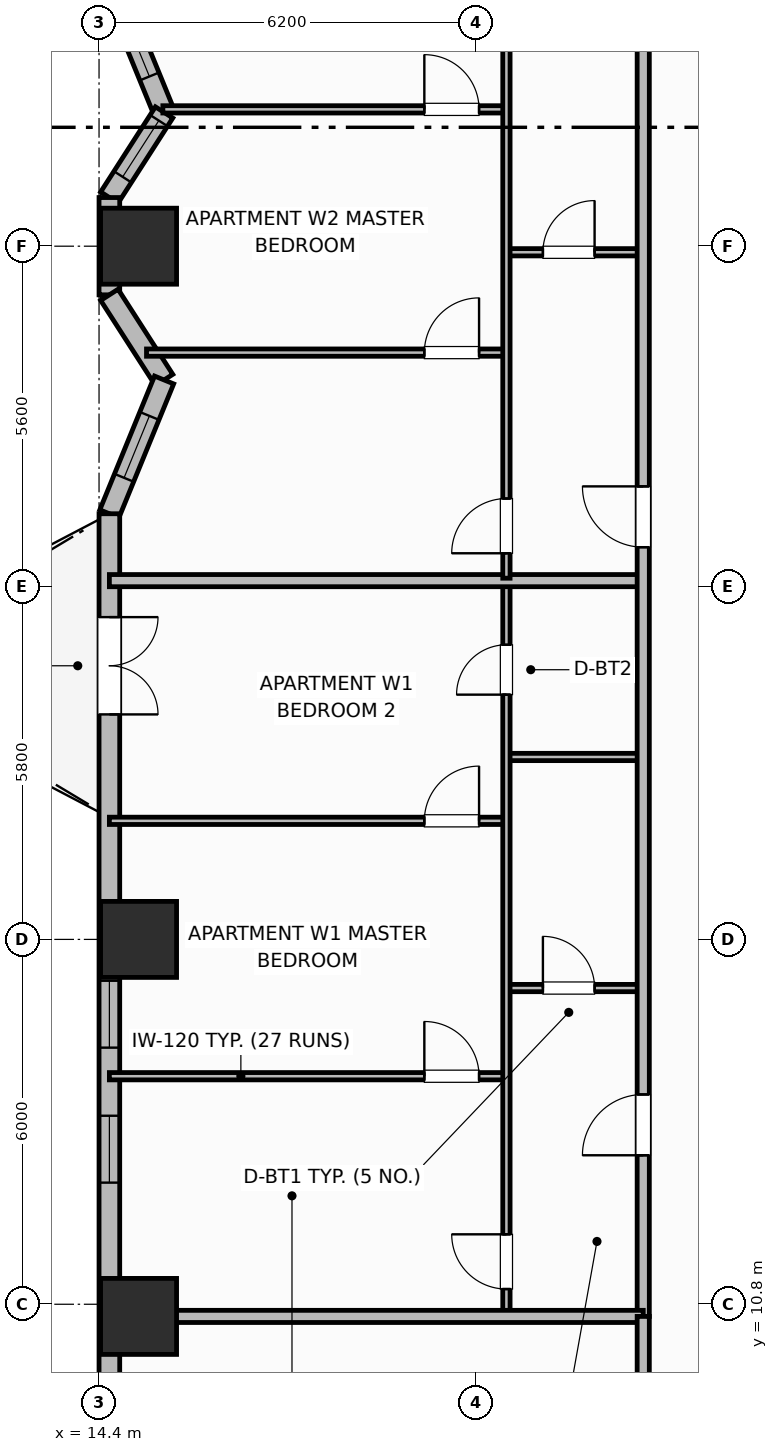
"""IFC4 building model, lengths in metres.
Left out: names, types, materials, properties, quantities, classifications, styles, units other than length and angle.
Written with IfcOpenShell. Run it as: python <this file> out.ifc"""

import sys

from ifc_helpers import new_model, si_unit, direction, frame, frame_2d, origin, origin_2d, place, context, subcontext, project, spatial, rectangle, extrude, element, fill, save


model = new_model("IFC4")
c1 = context("Model", 3, precision=1e-05, world=origin(), true_north=direction((0.0, 1.0)))
c2 = subcontext(c1, "Body", "Model", "MODEL_VIEW")
j1 = project(units=[si_unit("LENGTHUNIT", "METRE"), si_unit("PLANEANGLEUNIT", "RADIAN")], contexts=[c1])
p1 = place(None, origin())
s1 = spatial("IfcSite", under=j1, at=p1, CompositionType="ELEMENT")
p2 = place(p1, origin())
s2 = spatial("IfcBuilding", under=s1, at=p2, CompositionType="ELEMENT")
p3 = place(p2, frame((0.0, 0.0, 36.2)))
s3 = spatial("IfcBuildingStorey", under=s2, at=p3, CompositionType="ELEMENT", Elevation=36.2)
for number, where, z_axis, x_axis in (
    (1, (15.05, 10.6, 0.0), (0.0, 0.0, 1.0), (1.0, 0.0, 0.0)),
    (2, (15.05, 16.8, 0.0), (0.0, 0.0, 1.0), (1.0, 0.0, 0.0)),
    (3, (15.05, 28.2, 0.0), (0.0, 0.0, 1.0), (1.0, 0.0, 0.0)),
):
    element("IfcColumn", number, at=place(p3, frame(where, z_axis=z_axis, x_axis=x_axis)), inside=s3, PredefinedType="COLUMN", context=c2, shape_type="SweptSolid", body=[
        extrude(rectangle(XDim=1.25, YDim=1.25, at=origin_2d()), origin(), (0.0, 0.0, 1.0), 3.7),
    ])
p4 = place(p3, frame((14.57, 32.6, 0.0), z_axis=(0.0, 0.0, 1.0), x_axis=(0.378568858991, -0.925573130013, 0.0)))
e4 = element("IfcWall", 4, at=p4, inside=s3, PredefinedType="SOLIDWALL", context=c2, shape_type="SweptSolid", body=[
    extrude(rectangle(XDim=2.377, YDim=0.34, at=frame_2d((1.188, 0.0))), origin(), (0.0, 0.0, 1.0), 2.7),
])
p5 = place(p4, frame((0.638, 0.0, 0.89)))
e5 = element("IfcOpeningElement", 5, at=p5, cuts=e4, PredefinedType="OPENING", context=c2, shape_type="SweptSolid", body=[
    extrude(rectangle(XDim=1.1, YDim=1.65, at=frame_2d((0.55, 0.825))), frame((0.0, 0.18, 0.0), z_axis=(0.0, -1.0, 0.0), x_axis=(1.0, 0.0, 0.0)), (0.0, 0.0, 1.0), 0.36),
])
p6 = place(p3, frame((15.47, 30.4, 0.0), z_axis=(0.0, 0.0, 1.0), x_axis=(-0.540742762169, -0.841188008214, 0.0)))
e6 = element("IfcWall", 6, at=p6, inside=s3, PredefinedType="SOLIDWALL", context=c2, shape_type="SweptSolid", body=[
    extrude(rectangle(XDim=1.664, YDim=0.34, at=frame_2d((0.832, 0.0))), origin(), (0.0, 0.0, 1.0), 2.7),
])
p7 = place(p6, frame((0.16, 0.0, 0.89)))
e7 = element("IfcOpeningElement", 7, at=p7, cuts=e6, PredefinedType="OPENING", context=c2, shape_type="SweptSolid", body=[
    extrude(rectangle(XDim=1.1, YDim=1.65, at=frame_2d((0.55, 0.825))), frame((0.0, 0.18, 0.0), z_axis=(0.0, -1.0, 0.0), x_axis=(1.0, 0.0, 0.0)), (0.0, 0.0, 1.0), 0.36),
])
p8 = place(p3, frame((14.57, 29.0, 0.0), z_axis=(0.0, 0.0, 1.0), x_axis=(0.0, -1.0, 0.0)))
e8 = element("IfcWall", 8, at=p8, inside=s3, PredefinedType="SOLIDWALL", context=c2, shape_type="SweptSolid", body=[
    extrude(rectangle(XDim=1.6, YDim=0.34, at=frame_2d((0.8, 0.0))), origin(), (0.0, 0.0, 1.0), 2.7),
])
p9 = place(p3, frame((14.57, 27.4, 0.0), z_axis=(0.0, 0.0, 1.0), x_axis=(0.540742762169, -0.841188008214, 0.0)))
e9 = element("IfcWall", 9, at=p9, inside=s3, PredefinedType="SOLIDWALL", context=c2, shape_type="SweptSolid", body=[
    extrude(rectangle(XDim=1.664, YDim=0.34, at=frame_2d((0.832, 0.0))), origin(), (0.0, 0.0, 1.0), 2.7),
])
p10 = place(p3, frame((15.47, 26.0, 0.0), z_axis=(0.0, 0.0, 1.0), x_axis=(-0.378604849088, -0.925558408879, 0.0)))
e10 = element("IfcWall", 10, at=p10, inside=s3, PredefinedType="SOLIDWALL", context=c2, shape_type="SweptSolid", body=[
    extrude(rectangle(XDim=2.377, YDim=0.34, at=frame_2d((1.188, 0.0))), origin(), (0.0, 0.0, 1.0), 2.7),
])
p11 = place(p10, frame((0.638, 0.0, 0.89)))
e11 = element("IfcOpeningElement", 11, at=p11, cuts=e10, PredefinedType="OPENING", context=c2, shape_type="SweptSolid", body=[
    extrude(rectangle(XDim=1.1, YDim=1.65, at=frame_2d((0.55, 0.825))), frame((0.0, 0.18, 0.0), z_axis=(0.0, -1.0, 0.0), x_axis=(1.0, 0.0, 0.0)), (0.0, 0.0, 1.0), 0.36),
])
p12 = place(p3, frame((14.57, 23.8, 0.0), z_axis=(0.0, 0.0, 1.0), x_axis=(0.0, -1.0, 0.0)))
e12 = element("IfcWall", 12, at=p12, inside=s3, PredefinedType="SOLIDWALL", context=c2, shape_type="SweptSolid", body=[
    extrude(rectangle(XDim=14.8, YDim=0.34, at=frame_2d((7.4, 0.0))), origin(), (0.0, 0.0, 1.0), 2.7),
])
p13 = place(p12, frame((1.7, 0.0, 0.0)))
e13 = element("IfcOpeningElement", 13, at=p13, cuts=e12, PredefinedType="OPENING", context=c2, shape_type="SweptSolid", body=[
    extrude(rectangle(XDim=1.6, YDim=2.1, at=frame_2d((0.8, 1.05))), frame((0.0, 0.18, 0.0), z_axis=(0.0, -1.0, 0.0), x_axis=(1.0, 0.0, 0.0)), (0.0, 0.0, 1.0), 0.36),
])
p14 = place(p12, frame((7.68, 0.0, 0.89)))
e14 = element("IfcOpeningElement", 14, at=p14, cuts=e12, PredefinedType="OPENING", context=c2, shape_type="SweptSolid", body=[
    extrude(rectangle(XDim=1.1, YDim=1.65, at=frame_2d((0.55, 0.825))), frame((0.0, 0.18, 0.0), z_axis=(0.0, -1.0, 0.0), x_axis=(1.0, 0.0, 0.0)), (0.0, 0.0, 1.0), 0.36),
])
p15 = place(p12, frame((9.9, 0.0, 0.93)))
e15 = element("IfcOpeningElement", 15, at=p15, cuts=e12, PredefinedType="OPENING", context=c2, shape_type="SweptSolid", body=[
    extrude(rectangle(XDim=1.1, YDim=1.65, at=frame_2d((0.55, 0.825))), frame((0.0, 0.18, 0.0), z_axis=(0.0, -1.0, 0.0), x_axis=(1.0, 0.0, 0.0)), (0.0, 0.0, 1.0), 0.36),
])
p16 = place(p3, frame((21.1, 16.0, 0.0), z_axis=(0.0, 0.0, 1.0), x_axis=(1.0, 0.0, 0.0)))
e16 = element("IfcWall", 16, at=p16, inside=s3, PredefinedType="PARTITIONING", context=c2, shape_type="SweptSolid", body=[
    extrude(rectangle(XDim=2.25, YDim=0.12, at=frame_2d((1.125, 0.0))), origin(), (0.0, 0.0, 1.0), 2.53),
])
p17 = place(p16, frame((0.6, 0.0, 0.0)))
e17 = element("IfcOpeningElement", 17, at=p17, cuts=e16, PredefinedType="OPENING", context=c2, shape_type="SweptSolid", body=[
    extrude(rectangle(XDim=0.85, YDim=2.1, at=frame_2d((0.425, 1.05))), frame((0.0, 0.07, 0.0), z_axis=(0.0, -1.0, 0.0), x_axis=(1.0, 0.0, 0.0)), (0.0, 0.0, 1.0), 0.14),
])
p18 = place(p3, frame((21.1, 19.8, 0.0), z_axis=(0.0, 0.0, 1.0), x_axis=(1.0, 0.0, 0.0)))
e18 = element("IfcWall", 18, at=p18, inside=s3, PredefinedType="PARTITIONING", context=c2, shape_type="SweptSolid", body=[
    extrude(rectangle(XDim=2.25, YDim=0.12, at=frame_2d((1.125, 0.0))), origin(), (0.0, 0.0, 1.0), 2.53),
])
p19 = place(p3, frame((14.57, 14.55, 0.0), z_axis=(0.0, 0.0, 1.0), x_axis=(1.0, 0.0, 0.0)))
e19 = element("IfcWall", 19, at=p19, inside=s3, PredefinedType="PARTITIONING", context=c2, shape_type="SweptSolid", body=[
    extrude(rectangle(XDim=6.53, YDim=0.12, at=frame_2d((3.265, 0.0))), origin(), (0.0, 0.0, 1.0), 2.53),
])
p20 = place(p19, frame((5.18, 0.0, 0.0)))
e20 = element("IfcOpeningElement", 20, at=p20, cuts=e19, PredefinedType="OPENING", context=c2, shape_type="SweptSolid", body=[
    extrude(rectangle(XDim=0.9, YDim=2.1, at=frame_2d((0.45, 1.05))), frame((0.0, 0.07, 0.0), z_axis=(0.0, -1.0, 0.0), x_axis=(1.0, 0.0, 0.0)), (0.0, 0.0, 1.0), 0.14),
])
p21 = place(p3, frame((14.57, 18.75, 0.0), z_axis=(0.0, 0.0, 1.0), x_axis=(1.0, 0.0, 0.0)))
e21 = element("IfcWall", 21, at=p21, inside=s3, PredefinedType="PARTITIONING", context=c2, shape_type="SweptSolid", body=[
    extrude(rectangle(XDim=6.53, YDim=0.12, at=frame_2d((3.265, 0.0))), origin(), (0.0, 0.0, 1.0), 2.53),
])
p22 = place(p21, frame((5.18, 0.0, 0.0)))
e22 = element("IfcOpeningElement", 22, at=p22, cuts=e21, PredefinedType="OPENING", context=c2, shape_type="SweptSolid", body=[
    extrude(rectangle(XDim=0.9, YDim=2.1, at=frame_2d((0.45, 1.05))), frame((0.0, 0.07, 0.0), z_axis=(0.0, -1.0, 0.0), x_axis=(1.0, 0.0, 0.0)), (0.0, 0.0, 1.0), 0.14),
])
p23 = place(p3, frame((21.1, 10.64, 0.0), z_axis=(0.0, 0.0, 1.0), x_axis=(0.0, 1.0, 0.0)))
e23 = element("IfcWall", 23, at=p23, inside=s3, PredefinedType="PARTITIONING", context=c2, shape_type="SweptSolid", body=[
    extrude(rectangle(XDim=12.02, YDim=0.12, at=frame_2d((6.01, 0.0))), origin(), (0.0, 0.0, 1.0), 2.53),
])
p24 = place(p23, frame((0.41, 0.0, 0.0)))
e24 = element("IfcOpeningElement", 24, at=p24, cuts=e23, PredefinedType="OPENING", context=c2, shape_type="SweptSolid", body=[
    extrude(rectangle(XDim=0.9, YDim=2.1, at=frame_2d((0.45, 1.05))), frame((0.0, 0.07, 0.0), z_axis=(0.0, -1.0, 0.0), x_axis=(1.0, 0.0, 0.0)), (0.0, 0.0, 1.0), 0.14),
])
p25 = place(p23, frame((10.185, 0.0, 0.0)))
e25 = element("IfcOpeningElement", 25, at=p25, cuts=e23, PredefinedType="OPENING", context=c2, shape_type="SweptSolid", body=[
    extrude(rectangle(XDim=0.82, YDim=2.08, at=frame_2d((0.41, 1.04))), frame((0.0, 0.07, 0.0), z_axis=(0.0, -1.0, 0.0), x_axis=(1.0, 0.0, 0.0)), (0.0, 0.0, 1.0), 0.14),
])
p26 = place(p3, frame((14.57, 22.7, 0.0), z_axis=(0.0, 0.0, 1.0), x_axis=(1.0, 0.0, 0.0)))
e26 = element("IfcWall", 26, at=p26, inside=s3, PredefinedType="PARTITIONING", context=c2, shape_type="SweptSolid", body=[
    extrude(rectangle(XDim=8.78, YDim=0.2, at=frame_2d((4.39, 0.0))), origin(), (0.0, 0.0, 1.0), 2.53),
])
p27 = place(p3, frame((21.1, 28.1, 0.0), z_axis=(0.0, 0.0, 1.0), x_axis=(1.0, 0.0, 0.0)))
e27 = element("IfcWall", 27, at=p27, inside=s3, PredefinedType="PARTITIONING", context=c2, shape_type="SweptSolid", body=[
    extrude(rectangle(XDim=2.25, YDim=0.12, at=frame_2d((1.125, 0.0))), origin(), (0.0, 0.0, 1.0), 2.53),
])
p28 = place(p27, frame((0.6, 0.0, 0.0)))
e28 = element("IfcOpeningElement", 28, at=p28, cuts=e27, PredefinedType="OPENING", context=c2, shape_type="SweptSolid", body=[
    extrude(rectangle(XDim=0.85, YDim=2.1, at=frame_2d((0.425, 1.05))), frame((0.0, 0.07, 0.0), z_axis=(0.0, -1.0, 0.0), x_axis=(1.0, 0.0, 0.0)), (0.0, 0.0, 1.0), 0.14),
])
p29 = place(p3, frame((15.181, 26.45, 0.0), z_axis=(0.0, 0.0, 1.0), x_axis=(1.0, 0.0, 0.0)))
e29 = element("IfcWall", 29, at=p29, inside=s3, PredefinedType="PARTITIONING", context=c2, shape_type="SweptSolid", body=[
    extrude(rectangle(XDim=5.919, YDim=0.12, at=frame_2d((2.96, 0.0))), origin(), (0.0, 0.0, 1.0), 2.53),
])
p30 = place(p29, frame((4.569, 0.0, 0.0)))
e30 = element("IfcOpeningElement", 30, at=p30, cuts=e29, PredefinedType="OPENING", context=c2, shape_type="SweptSolid", body=[
    extrude(rectangle(XDim=0.9, YDim=2.1, at=frame_2d((0.45, 1.05))), frame((0.0, 0.07, 0.0), z_axis=(0.0, -1.0, 0.0), x_axis=(1.0, 0.0, 0.0)), (0.0, 0.0, 1.0), 0.14),
])
p31 = place(p3, frame((15.449, 30.45, 0.0), z_axis=(0.0, 0.0, 1.0), x_axis=(1.0, 0.0, 0.0)))
e31 = element("IfcWall", 31, at=p31, inside=s3, PredefinedType="PARTITIONING", context=c2, shape_type="SweptSolid", body=[
    extrude(rectangle(XDim=5.651, YDim=0.12, at=frame_2d((2.825, 0.0))), origin(), (0.0, 0.0, 1.0), 2.53),
])
p32 = place(p31, frame((4.301, 0.0, 0.0)))
e32 = element("IfcOpeningElement", 32, at=p32, cuts=e31, PredefinedType="OPENING", context=c2, shape_type="SweptSolid", body=[
    extrude(rectangle(XDim=0.9, YDim=2.1, at=frame_2d((0.45, 1.05))), frame((0.0, 0.07, 0.0), z_axis=(0.0, -1.0, 0.0), x_axis=(1.0, 0.0, 0.0)), (0.0, 0.0, 1.0), 0.14),
])
p33 = place(p3, frame((21.1, 22.74, 0.0), z_axis=(0.0, 0.0, 1.0), x_axis=(0.0, 1.0, 0.0)))
e33 = element("IfcWall", 33, at=p33, inside=s3, PredefinedType="PARTITIONING", context=c2, shape_type="SweptSolid", body=[
    extrude(rectangle(XDim=11.404, YDim=0.12, at=frame_2d((5.702, 0.0))), origin(), (0.0, 0.0, 1.0), 2.53),
])
p34 = place(p33, frame((0.41, 0.0, 0.0)))
e34 = element("IfcOpeningElement", 34, at=p34, cuts=e33, PredefinedType="OPENING", context=c2, shape_type="SweptSolid", body=[
    extrude(rectangle(XDim=0.9, YDim=2.1, at=frame_2d((0.45, 1.05))), frame((0.0, 0.07, 0.0), z_axis=(0.0, -1.0, 0.0), x_axis=(1.0, 0.0, 0.0)), (0.0, 0.0, 1.0), 0.14),
])
p35 = place(p3, frame((23.35, 10.6, 0.0), z_axis=(0.0, 0.0, 1.0), x_axis=(0.0, 1.0, 0.0)))
e35 = element("IfcWall", 35, at=p35, inside=s3, PredefinedType="PARTITIONING", context=c2, shape_type="SweptSolid", body=[
    extrude(rectangle(XDim=35.2, YDim=0.2, at=frame_2d((17.6, 0.0))), origin(), (0.0, 0.0, 1.0), 2.53),
])
p36 = place(p35, frame((2.65, 0.0, 0.0)))
e36 = element("IfcOpeningElement", 36, at=p36, cuts=e35, PredefinedType="OPENING", context=c2, shape_type="SweptSolid", body=[
    extrude(rectangle(XDim=1.0, YDim=2.15, at=frame_2d((0.5, 1.075))), frame((0.0, 0.11, 0.0), z_axis=(0.0, -1.0, 0.0), x_axis=(1.0, 0.0, 0.0)), (0.0, 0.0, 1.0), 0.22),
])
p37 = place(p35, frame((12.65, 0.0, 0.0)))
e37 = element("IfcOpeningElement", 37, at=p37, cuts=e35, PredefinedType="OPENING", context=c2, shape_type="SweptSolid", body=[
    extrude(rectangle(XDim=1.0, YDim=2.15, at=frame_2d((0.5, 1.075))), frame((0.0, 0.11, 0.0), z_axis=(0.0, -1.0, 0.0), x_axis=(1.0, 0.0, 0.0)), (0.0, 0.0, 1.0), 0.22),
])
p38 = place(p35, frame((24.134, 0.0, 0.0)))
e38 = element("IfcOpeningElement", 38, at=p38, cuts=e35, PredefinedType="OPENING", context=c2, shape_type="SweptSolid", body=[
    extrude(rectangle(XDim=1.0, YDim=2.15, at=frame_2d((0.5, 1.075))), frame((0.0, 0.11, 0.0), z_axis=(0.0, -1.0, 0.0), x_axis=(1.0, 0.0, 0.0)), (0.0, 0.0, 1.0), 0.22),
])
p39 = place(p3, frame((14.99, 10.6, 0.0), z_axis=(0.0, 0.0, 1.0), x_axis=(1.0, 0.0, 0.0)))
e39 = element("IfcWall", 39, at=p39, inside=s3, PredefinedType="PARTITIONING", context=c2, shape_type="SweptSolid", body=[
    extrude(rectangle(XDim=8.36, YDim=0.2, at=frame_2d((4.18, 0.0))), origin(), (0.0, 0.0, 1.0), 2.53),
])
p40 = place(p3, frame((23.35, 4.97, 0.0), z_axis=(0.0, 0.0, 1.0), x_axis=(0.0, 1.0, 0.0)))
e40 = element("IfcWall", 40, at=p40, inside=s3, PredefinedType="PARTITIONING", context=c2, shape_type="SweptSolid", body=[
    extrude(rectangle(XDim=5.63, YDim=0.2, at=frame_2d((2.815, 0.0))), origin(), (0.0, 0.0, 1.0), 2.53),
])
p41 = place(p5, origin())
e41 = element("IfcWindow", 41, at=p41, inside=s3, PartitioningType="SINGLE_PANEL", PredefinedType="WINDOW", context=c2, shape_type="SweptSolid", body=[
    extrude(rectangle(XDim=1.1, YDim=1.65, at=frame_2d((0.55, 0.825))), frame((0.0, 0.03, 0.0), z_axis=(0.0, -1.0, 0.0), x_axis=(1.0, 0.0, 0.0)), (0.0, 0.0, 1.0), 0.06),
])
fill(e5, e41)
p42 = place(p7, origin())
e42 = element("IfcWindow", 42, at=p42, inside=s3, PartitioningType="SINGLE_PANEL", PredefinedType="WINDOW", context=c2, shape_type="SweptSolid", body=[
    extrude(rectangle(XDim=1.1, YDim=1.65, at=frame_2d((0.55, 0.825))), frame((0.0, 0.03, 0.0), z_axis=(0.0, -1.0, 0.0), x_axis=(1.0, 0.0, 0.0)), (0.0, 0.0, 1.0), 0.06),
])
fill(e7, e42)
p43 = place(p11, origin())
e43 = element("IfcWindow", 43, at=p43, inside=s3, PartitioningType="SINGLE_PANEL", PredefinedType="WINDOW", context=c2, shape_type="SweptSolid", body=[
    extrude(rectangle(XDim=1.1, YDim=1.65, at=frame_2d((0.55, 0.825))), frame((0.0, 0.03, 0.0), z_axis=(0.0, -1.0, 0.0), x_axis=(1.0, 0.0, 0.0)), (0.0, 0.0, 1.0), 0.06),
])
fill(e11, e43)
p44 = place(p13, origin())
e44 = element("IfcDoor", 44, at=p44, inside=s3, OperationType="DOUBLE_DOOR_SINGLE_SWING", PredefinedType="DOOR", context=c2, shape_type="SweptSolid", body=[
    extrude(rectangle(XDim=1.6, YDim=2.1, at=frame_2d((0.8, 1.05))), frame((0.0, 0.025, 0.0), z_axis=(0.0, -1.0, 0.0), x_axis=(1.0, 0.0, 0.0)), (0.0, 0.0, 1.0), 0.05),
])
fill(e13, e44)
p45 = place(p14, origin())
e45 = element("IfcWindow", 45, at=p45, inside=s3, PartitioningType="SINGLE_PANEL", PredefinedType="WINDOW", context=c2, shape_type="SweptSolid", body=[
    extrude(rectangle(XDim=1.1, YDim=1.65, at=frame_2d((0.55, 0.825))), frame((0.0, 0.03, 0.0), z_axis=(0.0, -1.0, 0.0), x_axis=(1.0, 0.0, 0.0)), (0.0, 0.0, 1.0), 0.06),
])
fill(e14, e45)
p46 = place(p15, origin())
e46 = element("IfcWindow", 46, at=p46, inside=s3, PartitioningType="SINGLE_PANEL", PredefinedType="WINDOW", context=c2, shape_type="SweptSolid", body=[
    extrude(rectangle(XDim=1.1, YDim=1.65, at=frame_2d((0.55, 0.825))), frame((0.0, 0.03, 0.0), z_axis=(0.0, -1.0, 0.0), x_axis=(1.0, 0.0, 0.0)), (0.0, 0.0, 1.0), 0.06),
])
fill(e15, e46)
p47 = place(p17, origin())
e47 = element("IfcDoor", 47, at=p47, inside=s3, OperationType="SINGLE_SWING_LEFT", PredefinedType="DOOR", context=c2, shape_type="SweptSolid", body=[
    extrude(rectangle(XDim=0.85, YDim=2.1, at=frame_2d((0.425, 1.05))), frame((0.0, 0.025, 0.0), z_axis=(0.0, -1.0, 0.0), x_axis=(1.0, 0.0, 0.0)), (0.0, 0.0, 1.0), 0.05),
])
fill(e17, e47)
p48 = place(p20, origin())
e48 = element("IfcDoor", 48, at=p48, inside=s3, OperationType="SINGLE_SWING_LEFT", PredefinedType="DOOR", context=c2, shape_type="SweptSolid", body=[
    extrude(rectangle(XDim=0.9, YDim=2.1, at=frame_2d((0.45, 1.05))), frame((0.0, 0.025, 0.0), z_axis=(0.0, -1.0, 0.0), x_axis=(1.0, 0.0, 0.0)), (0.0, 0.0, 1.0), 0.05),
])
fill(e20, e48)
p49 = place(p22, origin())
e49 = element("IfcDoor", 49, at=p49, inside=s3, OperationType="SINGLE_SWING_RIGHT", PredefinedType="DOOR", context=c2, shape_type="SweptSolid", body=[
    extrude(rectangle(XDim=0.9, YDim=2.1, at=frame_2d((0.45, 1.05))), frame((0.0, 0.025, 0.0), z_axis=(0.0, -1.0, 0.0), x_axis=(1.0, 0.0, 0.0)), (0.0, 0.0, 1.0), 0.05),
])
fill(e22, e49)
p50 = place(p24, origin())
e50 = element("IfcDoor", 50, at=p50, inside=s3, OperationType="SINGLE_SWING_RIGHT", PredefinedType="DOOR", context=c2, shape_type="SweptSolid", body=[
    extrude(rectangle(XDim=0.9, YDim=2.1, at=frame_2d((0.45, 1.05))), frame((0.0, 0.025, 0.0), z_axis=(0.0, -1.0, 0.0), x_axis=(1.0, 0.0, 0.0)), (0.0, 0.0, 1.0), 0.05),
])
fill(e24, e50)
p51 = place(p25, origin())
e51 = element("IfcDoor", 51, at=p51, inside=s3, OperationType="SINGLE_SWING_LEFT", PredefinedType="DOOR", context=c2, shape_type="SweptSolid", body=[
    extrude(rectangle(XDim=0.82, YDim=2.08, at=frame_2d((0.41, 1.04))), frame((0.0, 0.025, 0.0), z_axis=(0.0, -1.0, 0.0), x_axis=(1.0, 0.0, 0.0)), (0.0, 0.0, 1.0), 0.05),
])
fill(e25, e51)
p52 = place(p28, origin())
e52 = element("IfcDoor", 52, at=p52, inside=s3, OperationType="SINGLE_SWING_RIGHT", PredefinedType="DOOR", context=c2, shape_type="SweptSolid", body=[
    extrude(rectangle(XDim=0.85, YDim=2.1, at=frame_2d((0.425, 1.05))), frame((0.0, 0.025, 0.0), z_axis=(0.0, -1.0, 0.0), x_axis=(1.0, 0.0, 0.0)), (0.0, 0.0, 1.0), 0.05),
])
fill(e28, e52)
p53 = place(p30, origin())
e53 = element("IfcDoor", 53, at=p53, inside=s3, OperationType="SINGLE_SWING_RIGHT", PredefinedType="DOOR", context=c2, shape_type="SweptSolid", body=[
    extrude(rectangle(XDim=0.9, YDim=2.1, at=frame_2d((0.45, 1.05))), frame((0.0, 0.025, 0.0), z_axis=(0.0, -1.0, 0.0), x_axis=(1.0, 0.0, 0.0)), (0.0, 0.0, 1.0), 0.05),
])
fill(e30, e53)
p54 = place(p32, origin())
e54 = element("IfcDoor", 54, at=p54, inside=s3, OperationType="SINGLE_SWING_LEFT", PredefinedType="DOOR", context=c2, shape_type="SweptSolid", body=[
    extrude(rectangle(XDim=0.9, YDim=2.1, at=frame_2d((0.45, 1.05))), frame((0.0, 0.025, 0.0), z_axis=(0.0, -1.0, 0.0), x_axis=(1.0, 0.0, 0.0)), (0.0, 0.0, 1.0), 0.05),
])
fill(e32, e54)
p55 = place(p34, origin())
e55 = element("IfcDoor", 55, at=p55, inside=s3, OperationType="SINGLE_SWING_LEFT", PredefinedType="DOOR", context=c2, shape_type="SweptSolid", body=[
    extrude(rectangle(XDim=0.9, YDim=2.1, at=frame_2d((0.45, 1.05))), frame((0.0, 0.025, 0.0), z_axis=(0.0, -1.0, 0.0), x_axis=(1.0, 0.0, 0.0)), (0.0, 0.0, 1.0), 0.05),
])
fill(e34, e55)
p56 = place(p36, origin())
e56 = element("IfcDoor", 56, at=p56, inside=s3, OperationType="SINGLE_SWING_LEFT", PredefinedType="DOOR", context=c2, shape_type="SweptSolid", body=[
    extrude(rectangle(XDim=1.0, YDim=2.15, at=frame_2d((0.5, 1.075))), frame((0.0, 0.025, 0.0), z_axis=(0.0, -1.0, 0.0), x_axis=(1.0, 0.0, 0.0)), (0.0, 0.0, 1.0), 0.05),
])
fill(e36, e56)
p57 = place(p37, origin())
e57 = element("IfcDoor", 57, at=p57, inside=s3, OperationType="SINGLE_SWING_RIGHT", PredefinedType="DOOR", context=c2, shape_type="SweptSolid", body=[
    extrude(rectangle(XDim=1.0, YDim=2.15, at=frame_2d((0.5, 1.075))), frame((0.0, 0.025, 0.0), z_axis=(0.0, -1.0, 0.0), x_axis=(1.0, 0.0, 0.0)), (0.0, 0.0, 1.0), 0.05),
])
fill(e37, e57)
save(model, sys.argv[1])
